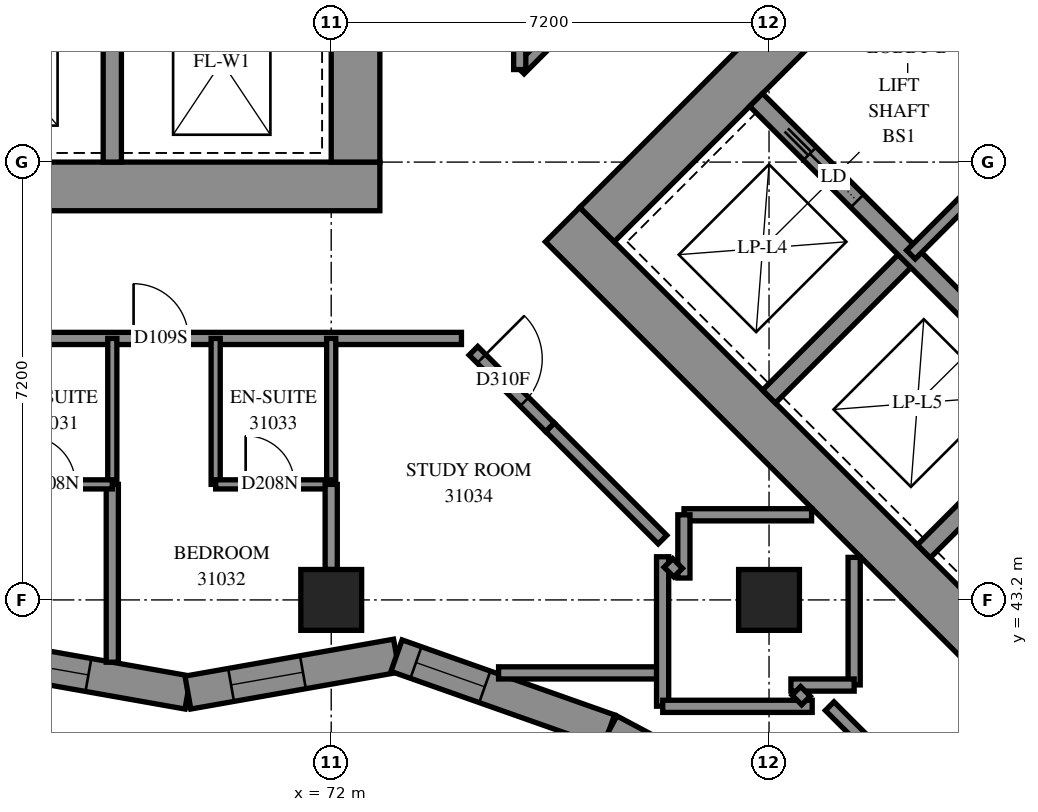
"""IFC4 building model, lengths in metres.
Left out: names, types, materials, properties, quantities, classifications, styles, units other than length and angle.
Written with IfcOpenShell. Run it as: python <this file> out.ifc"""

import sys

from ifc_helpers import new_model, si_unit, direction, frame, frame_2d, origin, origin_2d, place, context, subcontext, project, spatial, polyline, rectangle, outline, extrude, element, fill, save


model = new_model("IFC4")
c1 = context("Model", 3, precision=1e-05, world=origin(), true_north=direction((0.0, 1.0)))
c2 = subcontext(c1, "Body", "Model", "MODEL_VIEW")
j1 = project(units=[si_unit("LENGTHUNIT", "METRE"), si_unit("PLANEANGLEUNIT", "RADIAN")], contexts=[c1])
p1 = place(None, origin())
s1 = spatial("IfcSite", under=j1, at=p1, CompositionType="ELEMENT")
p2 = place(p1, origin())
s2 = spatial("IfcBuilding", under=s1, at=p2, CompositionType="ELEMENT")
p3 = place(p2, frame((0.0, 0.0, 115.2)))
s3 = spatial("IfcBuildingStorey", under=s2, at=p3, CompositionType="ELEMENT", Elevation=115.2)
for number, where, z_axis, x_axis in (
    (1, (72.0, 43.2, 0.0), (0.0, 0.0, 1.0), (1.0, 0.0, 0.0)),
    (2, (79.2, 43.2, 0.0), (0.0, 0.0, 1.0), (1.0, 0.0, 0.0)),
):
    element("IfcColumn", number, at=place(p3, frame(where, z_axis=z_axis, x_axis=x_axis)), inside=s3, PredefinedType="COLUMN", context=c2, shape_type="SweptSolid", body=[
        extrude(rectangle(XDim=1.0, YDim=1.0, at=origin_2d()), origin(), (0.0, 0.0, 1.0), 3.1),
    ])
p4 = place(p3, frame((56.8, 50.0, -0.3), z_axis=(0.0, 0.0, 1.0), x_axis=(1.0, 0.0, 0.0)))
e3 = element("IfcWall", 3, at=p4, inside=s3, PredefinedType="SHEAR", context=c2, shape_type="SweptSolid", body=[
    extrude(rectangle(XDim=16.0, YDim=0.8, at=frame_2d((8.0, 0.0))), origin(), (0.0, 0.0, 1.0), 2.7),
])
p5 = place(p3, frame((72.4, 50.4, -0.3), z_axis=(0.0, 0.0, 1.0), x_axis=(0.0, 1.0, 0.0)))
e4 = element("IfcWall", 4, at=p5, inside=s3, PredefinedType="SHEAR", context=c2, shape_type="SweptSolid", body=[
    extrude(rectangle(XDim=14.4, YDim=0.8, at=frame_2d((7.2, 0.0))), origin(), (0.0, 0.0, 1.0), 2.7),
])
p6 = place(p5, frame((4.55, 0.0, 0.3)))
e5 = element("IfcOpeningElement", 5, at=p6, cuts=e4, PredefinedType="OPENING", context=c2, shape_type="SweptSolid", body=[
    extrude(rectangle(XDim=1.1, YDim=2.1, at=frame_2d((0.55, 1.05))), frame((0.0, 0.41, 0.0), z_axis=(0.0, -1.0, 0.0), x_axis=(1.0, 0.0, 0.0)), (0.0, 0.0, 1.0), 0.82),
])
p7 = place(p5, frame((11.35, 0.0, 0.3)))
e6 = element("IfcOpeningElement", 6, at=p7, cuts=e4, PredefinedType="OPENING", context=c2, shape_type="SweptSolid", body=[
    extrude(rectangle(XDim=1.1, YDim=2.1, at=frame_2d((0.55, 1.05))), frame((0.0, 0.41, 0.0), z_axis=(0.0, -1.0, 0.0), x_axis=(1.0, 0.0, 0.0)), (0.0, 0.0, 1.0), 0.82),
])
p8 = place(p3, frame((68.4, 50.4, 0.0), z_axis=(0.0, 0.0, 1.0), x_axis=(0.0, 1.0, 0.0)))
e7 = element("IfcWall", 7, at=p8, inside=s3, PredefinedType="SOLIDWALL", context=c2, shape_type="SweptSolid", body=[
    extrude(rectangle(XDim=3.3, YDim=0.3, at=frame_2d((1.65, 0.0))), origin(), (0.0, 0.0, 1.0), 3.1),
])
p9 = place(p3, frame((75.806, 49.373, -0.3), z_axis=(0.0, 0.0, 1.0), x_axis=(0.7071067812, -0.7071067812, 0.0)))
e8 = element("IfcWall", 8, at=p9, inside=s3, PredefinedType="SHEAR", context=c2, shape_type="SweptSolid", body=[
    extrude(rectangle(XDim=16.0, YDim=0.8, at=frame_2d((8.0, 0.0))), origin(), (0.0, 0.0, 1.0), 2.7),
])
p10 = place(p3, frame((76.372, 49.373, -0.3), z_axis=(0.0, 0.0, 1.0), x_axis=(0.7071067812, 0.7071067812, 0.0)))
e9 = element("IfcWall", 9, at=p10, inside=s3, PredefinedType="SHEAR", context=c2, shape_type="SweptSolid", body=[
    extrude(rectangle(XDim=14.4, YDim=0.8, at=frame_2d((7.2, 0.0))), origin(), (0.0, 0.0, 1.0), 2.7),
])
p11 = place(p10, frame((4.55, 0.0, 0.3)))
e10 = element("IfcOpeningElement", 10, at=p11, cuts=e9, PredefinedType="OPENING", context=c2, shape_type="SweptSolid", body=[
    extrude(rectangle(XDim=1.1, YDim=2.1, at=frame_2d((0.55, 1.05))), frame((0.0, 0.41, 0.0), z_axis=(0.0, -1.0, 0.0), x_axis=(1.0, 0.0, 0.0)), (0.0, 0.0, 1.0), 0.82),
])
p12 = place(p10, frame((11.35, 0.0, 0.3)))
e11 = element("IfcOpeningElement", 11, at=p12, cuts=e9, PredefinedType="OPENING", context=c2, shape_type="SweptSolid", body=[
    extrude(rectangle(XDim=1.1, YDim=2.1, at=frame_2d((0.55, 1.05))), frame((0.0, 0.41, 0.0), z_axis=(0.0, -1.0, 0.0), x_axis=(1.0, 0.0, 0.0)), (0.0, 0.0, 1.0), 0.82),
])
p13 = place(p3, frame((79.2, 46.544, 0.0), z_axis=(0.0, 0.0, 1.0), x_axis=(0.7071219326, 0.7070916295, 0.0)))
e12 = element("IfcWall", 12, at=p13, inside=s3, PredefinedType="SOLIDWALL", context=c2, shape_type="SweptSolid", body=[
    extrude(rectangle(XDim=3.3, YDim=0.3, at=frame_2d((1.65, 0.0))), origin(), (0.0, 0.0, 1.0), 3.1),
])
p14 = place(p3, frame((81.746, 43.999, 0.0), z_axis=(0.0, 0.0, 1.0), x_axis=(0.7071067812, 0.7071067812, 0.0)))
e13 = element("IfcWall", 13, at=p14, inside=s3, PredefinedType="SOLIDWALL", context=c2, shape_type="SweptSolid", body=[
    extrude(rectangle(XDim=3.3, YDim=0.3, at=frame_2d((1.65, 0.0))), origin(), (0.0, 0.0, 1.0), 3.1),
])
p15 = place(p3, frame((78.988, 51.423, 0.0), z_axis=(0.0, 0.0, 1.0), x_axis=(0.7071067812, -0.7071067812, 0.0)))
e14 = element("IfcWall", 14, at=p15, inside=s3, PredefinedType="SOLIDWALL", context=c2, shape_type="SweptSolid", body=[
    extrude(rectangle(XDim=14.4, YDim=0.3, at=frame_2d((7.2, 0.0))), origin(), (0.0, 0.0, 1.0), 3.1),
])
p16 = place(p15, frame((1.25, 0.0, 0.0)))
e15 = element("IfcOpeningElement", 15, at=p16, cuts=e14, PredefinedType="OPENING", context=c2, shape_type="SweptSolid", body=[
    extrude(rectangle(XDim=1.1, YDim=2.1, at=frame_2d((0.55, 1.05))), frame((0.0, 0.16, 0.0), z_axis=(0.0, -1.0, 0.0), x_axis=(1.0, 0.0, 0.0)), (0.0, 0.0, 1.0), 0.32),
])
p17 = place(p15, frame((4.85, 0.0, 0.0)))
e16 = element("IfcOpeningElement", 16, at=p17, cuts=e14, PredefinedType="OPENING", context=c2, shape_type="SweptSolid", body=[
    extrude(rectangle(XDim=1.1, YDim=2.1, at=frame_2d((0.55, 1.05))), frame((0.0, 0.16, 0.0), z_axis=(0.0, -1.0, 0.0), x_axis=(1.0, 0.0, 0.0)), (0.0, 0.0, 1.0), 0.32),
])
p18 = place(p15, frame((8.45, 0.0, 0.0)))
e17 = element("IfcOpeningElement", 17, at=p18, cuts=e14, PredefinedType="OPENING", context=c2, shape_type="SweptSolid", body=[
    extrude(rectangle(XDim=1.1, YDim=2.1, at=frame_2d((0.55, 1.05))), frame((0.0, 0.16, 0.0), z_axis=(0.0, -1.0, 0.0), x_axis=(1.0, 0.0, 0.0)), (0.0, 0.0, 1.0), 0.32),
])
p19 = place(p15, frame((12.05, 0.0, 0.0)))
e18 = element("IfcOpeningElement", 18, at=p19, cuts=e14, PredefinedType="OPENING", context=c2, shape_type="SweptSolid", body=[
    extrude(rectangle(XDim=1.1, YDim=2.1, at=frame_2d((0.55, 1.05))), frame((0.0, 0.16, 0.0), z_axis=(0.0, -1.0, 0.0), x_axis=(1.0, 0.0, 0.0)), (0.0, 0.0, 1.0), 0.32),
])
p20 = place(p3, frame((81.534, 53.969, 0.0), z_axis=(0.0, 0.0, 1.0), x_axis=(0.707103309, -0.7071102534, 0.0)))
e19 = element("IfcWall", 19, at=p20, inside=s3, PredefinedType="SOLIDWALL", context=c2, shape_type="SweptSolid", body=[
    extrude(rectangle(XDim=14.4, YDim=0.3, at=frame_2d((7.2, 0.0))), origin(), (0.0, 0.0, 1.0), 3.1),
])
p21 = place(p20, frame((12.05, 0.0, 0.0)))
e20 = element("IfcOpeningElement", 20, at=p21, cuts=e19, PredefinedType="OPENING", context=c2, shape_type="SweptSolid", body=[
    extrude(rectangle(XDim=1.1, YDim=2.1, at=frame_2d((0.55, 1.05))), frame((0.0, 0.16, 0.0), z_axis=(0.0, -1.0, 0.0), x_axis=(1.0, 0.0, 0.0)), (0.0, 0.0, 1.0), 0.32),
])
p22 = place(p3, frame((66.236, 42.279, 0.0), z_axis=(0.0, 0.0, 1.0), x_axis=(0.9846979018, -0.1742700266, 0.0)))
e21 = element("IfcWall", 21, at=p22, inside=s3, PredefinedType="SOLIDWALL", context=c2, shape_type="SweptSolid", body=[
    extrude(outline(polyline([(0.049, -0.275), (3.509, -0.275), (3.412, 0.275), (-0.049, 0.275), (0.049, -0.275)])), origin(), (0.0, 0.0, 1.0), 3.1),
])
p23 = place(p22, frame((0.599, 0.0, 0.5)))
e22 = element("IfcOpeningElement", 22, at=p23, cuts=e21, PredefinedType="OPENING", context=c2, shape_type="SweptSolid", body=[
    extrude(rectangle(XDim=1.2, YDim=2.45, at=frame_2d((0.6, 1.225))), frame((0.0, 0.285, 0.0), z_axis=(0.0, -1.0, 0.0), x_axis=(1.0, 0.0, 0.0)), (0.0, 0.0, 1.0), 0.57),
])
p24 = place(p3, frame((69.643, 41.676, 0.0), z_axis=(0.0, 0.0, 1.0), x_axis=(0.9846990638, 0.1742634606, 0.0)))
e23 = element("IfcWall", 23, at=p24, inside=s3, PredefinedType="SOLIDWALL", context=c2, shape_type="SweptSolid", body=[
    extrude(outline(polyline([(-0.049, -0.275), (3.412, -0.275), (3.556, 0.275), (0.049, 0.275), (-0.049, -0.275)])), origin(), (0.0, 0.0, 1.0), 3.1),
])
p25 = place(p24, frame((0.721, 0.0, 0.5)))
e24 = element("IfcOpeningElement", 24, at=p25, cuts=e23, PredefinedType="OPENING", context=c2, shape_type="SweptSolid", body=[
    extrude(rectangle(XDim=1.2, YDim=2.45, at=frame_2d((0.6, 1.225))), frame((0.0, 0.285, 0.0), z_axis=(0.0, -1.0, 0.0), x_axis=(1.0, 0.0, 0.0)), (0.0, 0.0, 1.0), 0.57),
])
p26 = place(p3, frame((73.074, 42.283, 0.0), z_axis=(0.0, 0.0, 1.0), x_axis=(0.9429529685, -0.3329259665, 0.0)))
e25 = element("IfcWall", 25, at=p26, inside=s3, PredefinedType="SOLIDWALL", context=c2, shape_type="SweptSolid", body=[
    extrude(outline(polyline([(0.072, -0.275), (3.686, -0.275), (3.727, 0.275), (-0.072, 0.275), (0.072, -0.275)])), origin(), (0.0, 0.0, 1.0), 3.1),
])
p27 = place(p26, frame((0.34, 0.0, 0.5)))
e26 = element("IfcOpeningElement", 26, at=p27, cuts=e25, PredefinedType="OPENING", context=c2, shape_type="SweptSolid", body=[
    extrude(rectangle(XDim=1.2, YDim=2.45, at=frame_2d((0.6, 1.225))), frame((0.0, 0.285, 0.0), z_axis=(0.0, -1.0, 0.0), x_axis=(1.0, 0.0, 0.0)), (0.0, 0.0, 1.0), 0.57),
])
p28 = place(p3, frame((76.569, 41.05, 0.0), z_axis=(0.0, 0.0, 1.0), x_axis=(0.882964841, -0.4694391223, 0.0)))
e27 = element("IfcWall", 27, at=p28, inside=s3, PredefinedType="SOLIDWALL", context=c2, shape_type="SweptSolid", body=[
    extrude(outline(polyline([(0.021, -0.275), (4.135, -0.275), (4.26, 0.275), (-0.021, 0.275), (0.021, -0.275)])), origin(), (0.0, 0.0, 1.0), 3.1),
])
p29 = place(p28, frame((0.724, 0.0, 0.5)))
e28 = element("IfcOpeningElement", 28, at=p29, cuts=e27, PredefinedType="OPENING", context=c2, shape_type="SweptSolid", body=[
    extrude(rectangle(XDim=1.2, YDim=2.45, at=frame_2d((0.6, 1.225))), frame((0.0, 0.285, 0.0), z_axis=(0.0, -1.0, 0.0), x_axis=(1.0, 0.0, 0.0)), (0.0, 0.0, 1.0), 0.57),
])
p30 = place(p28, frame((2.223, 0.0, 0.5)))
e29 = element("IfcOpeningElement", 29, at=p30, cuts=e27, PredefinedType="OPENING", context=c2, shape_type="SweptSolid", body=[
    extrude(rectangle(XDim=1.2, YDim=2.45, at=frame_2d((0.6, 1.225))), frame((0.0, 0.285, 0.0), z_axis=(0.0, -1.0, 0.0), x_axis=(1.0, 0.0, 0.0)), (0.0, 0.0, 1.0), 0.57),
])
p31 = place(p3, frame((81.534, 48.878, 0.0), z_axis=(0.0, 0.0, 1.0), x_axis=(0.707092892, 0.7071206701, 0.0)))
e30 = element("IfcWall", 30, at=p31, inside=s3, PredefinedType="PARTITIONING", context=c2, shape_type="SweptSolid", body=[
    extrude(rectangle(XDim=3.6, YDim=0.2, at=frame_2d((1.8, 0.0))), origin(), (0.0, 0.0, 1.0), 3.1),
])
p32 = place(p3, frame((54.7, 47.5, 0.0), z_axis=(0.0, 0.0, 1.0), x_axis=(1.0, 0.0, 0.0)))
e31 = element("IfcWall", 31, at=p32, inside=s3, PredefinedType="PARTITIONING", context=c2, shape_type="SweptSolid", body=[
    extrude(rectangle(XDim=19.442, YDim=0.2, at=frame_2d((9.721, 0.0))), origin(), (0.0, 0.0, 1.0), 3.1),
])
p33 = place(p32, frame((5.2, 0.0, 0.0)))
e32 = element("IfcOpeningElement", 32, at=p33, cuts=e31, PredefinedType="OPENING", context=c2, shape_type="SweptSolid", body=[
    extrude(rectangle(XDim=0.9, YDim=2.1, at=frame_2d((0.45, 1.05))), frame((0.0, 0.11, 0.0), z_axis=(0.0, -1.0, 0.0), x_axis=(1.0, 0.0, 0.0)), (0.0, 0.0, 1.0), 0.22),
])
p34 = place(p32, frame((8.757, 0.0, 0.0)))
e33 = element("IfcOpeningElement", 33, at=p34, cuts=e31, PredefinedType="OPENING", context=c2, shape_type="SweptSolid", body=[
    extrude(rectangle(XDim=0.9, YDim=2.1, at=frame_2d((0.45, 1.05))), frame((0.0, 0.11, 0.0), z_axis=(0.0, -1.0, 0.0), x_axis=(1.0, 0.0, 0.0)), (0.0, 0.0, 1.0), 0.22),
])
p35 = place(p32, frame((14.05, 0.0, 0.0)))
e34 = element("IfcOpeningElement", 34, at=p35, cuts=e31, PredefinedType="OPENING", context=c2, shape_type="SweptSolid", body=[
    extrude(rectangle(XDim=0.9, YDim=2.1, at=frame_2d((0.45, 1.05))), frame((0.0, 0.11, 0.0), z_axis=(0.0, -1.0, 0.0), x_axis=(1.0, 0.0, 0.0)), (0.0, 0.0, 1.0), 0.22),
])
p36 = place(p3, frame((80.197, 41.453, 0.0), z_axis=(0.0, 0.0, 1.0), x_axis=(0.7071067812, -0.7071067812, 0.0)))
e35 = element("IfcWall", 35, at=p36, inside=s3, PredefinedType="PARTITIONING", context=c2, shape_type="SweptSolid", body=[
    extrude(rectangle(XDim=6.488, YDim=0.2, at=frame_2d((3.244, 0.0))), origin(), (0.0, 0.0, 1.0), 3.1),
])
p37 = place(p3, frame((68.4, 42.176, 0.0), z_axis=(0.0, 0.0, 1.0), x_axis=(0.0, 1.0, 0.0)))
e36 = element("IfcWall", 36, at=p37, inside=s3, PredefinedType="PARTITIONING", context=c2, shape_type="SweptSolid", body=[
    extrude(rectangle(XDim=2.924, YDim=0.2, at=frame_2d((1.462, 0.0))), origin(), (0.0, 0.0, 1.0), 3.1),
])
p38 = place(p3, frame((75.102, 51.922, 0.0), z_axis=(0.0, 0.0, 1.0), x_axis=(0.7071067812, 0.7071067812, 0.0)))
e37 = element("IfcWall", 37, at=p38, inside=s3, PredefinedType="PARTITIONING", context=c2, shape_type="SweptSolid", body=[
    extrude(rectangle(XDim=2.797, YDim=0.2, at=frame_2d((1.399, 0.0))), origin(), (0.0, 0.0, 1.0), 3.1),
])
p39 = place(p3, frame((74.752, 42.0, 0.0), z_axis=(0.0, 0.0, 1.0), x_axis=(1.0, 0.0, 0.0)))
e38 = element("IfcWall", 38, at=p39, inside=s3, PredefinedType="PARTITIONING", context=c2, shape_type="SweptSolid", body=[
    extrude(rectangle(XDim=2.698, YDim=0.2, at=frame_2d((1.349, 0.0))), origin(), (0.0, 0.0, 1.0), 3.1),
])
p40 = place(p3, frame((75.598, 46.04, 0.0), z_axis=(0.0, 0.0, 1.0), x_axis=(0.7074891043, -0.7067242512, 0.0)))
e39 = element("IfcWall", 39, at=p40, inside=s3, PredefinedType="PARTITIONING", context=c2, shape_type="SweptSolid", body=[
    extrude(rectangle(XDim=2.615, YDim=0.2, at=frame_2d((1.308, 0.0))), origin(), (0.0, 0.0, 1.0), 3.1),
])
for number, where, z_axis, x_axis in (
    (40, (77.45, 41.452, 0.0), (0.0, 0.0, 1.0), (0.0, 1.0, 0.0)),
    (41, (77.452, 41.45, 0.0), (0.0, 0.0, 1.0), (1.0, 0.0, 0.0)),
):
    element("IfcWall", number, at=place(p3, frame(where, z_axis=z_axis, x_axis=x_axis)), inside=s3, PredefinedType="PARTITIONING", context=c2, shape_type="SweptSolid", body=[
        extrude(rectangle(XDim=2.458, YDim=0.2, at=frame_2d((1.229, 0.0))), origin(), (0.0, 0.0, 1.0), 3.1),
    ])
for number, where, z_axis, x_axis in (
    (42, (68.4, 45.1, 0.0), (0.0, 0.0, 1.0), (0.0, 1.0, 0.0)),
    (43, (70.1, 45.1, 0.0), (0.0, 0.0, 1.0), (0.0, 1.0, 0.0)),
    (44, (72.0, 45.1, 0.0), (0.0, 0.0, 1.0), (0.0, 1.0, 0.0)),
):
    element("IfcWall", number, at=place(p3, frame(where, z_axis=z_axis, x_axis=x_axis)), inside=s3, PredefinedType="PARTITIONING", context=c2, shape_type="SweptSolid", body=[
        extrude(rectangle(XDim=2.4, YDim=0.15, at=frame_2d((1.2, 0.0))), origin(), (0.0, 0.0, 1.0), 3.1),
    ])
for number, where, z_axis, x_axis in (
    (45, (77.802, 44.6, 0.0), (0.0, 0.0, 1.0), (1.0, 0.0, 0.0)),
    (46, (80.6, 41.802, 0.0), (0.0, 0.0, 1.0), (0.0, 1.0, 0.0)),
):
    element("IfcWall", number, at=place(p3, frame(where, z_axis=z_axis, x_axis=x_axis)), inside=s3, PredefinedType="PARTITIONING", context=c2, shape_type="SweptSolid", body=[
        extrude(rectangle(XDim=2.098, YDim=0.2, at=frame_2d((1.049, 0.0))), origin(), (0.0, 0.0, 1.0), 3.1),
    ])
p41 = place(p3, frame((75.1, 51.922, 0.0), z_axis=(0.0, 0.0, 1.0), x_axis=(0.0, 1.0, 0.0)))
e47 = element("IfcWall", 47, at=p41, inside=s3, PredefinedType="PARTITIONING", context=c2, shape_type="SweptSolid", body=[
    extrude(rectangle(XDim=1.978, YDim=0.2, at=frame_2d((0.989, 0.0))), origin(), (0.0, 0.0, 1.0), 3.1),
])
p42 = place(p3, frame((66.5, 45.1, 0.0), z_axis=(0.0, 0.0, 1.0), x_axis=(1.0, 0.0, 0.0)))
e48 = element("IfcWall", 48, at=p42, inside=s3, PredefinedType="PARTITIONING", context=c2, shape_type="SweptSolid", body=[
    extrude(rectangle(XDim=1.9, YDim=0.15, at=frame_2d((0.95, 0.0))), origin(), (0.0, 0.0, 1.0), 3.1),
])
p43 = place(p42, frame((0.493, 0.0, 0.0)))
e49 = element("IfcOpeningElement", 49, at=p43, cuts=e48, PredefinedType="OPENING", context=c2, shape_type="SweptSolid", body=[
    extrude(rectangle(XDim=0.8, YDim=2.1, at=frame_2d((0.4, 1.05))), frame((0.0, 0.085, 0.0), z_axis=(0.0, -1.0, 0.0), x_axis=(1.0, 0.0, 0.0)), (0.0, 0.0, 1.0), 0.17),
])
p44 = place(p3, frame((70.1, 45.1, 0.0), z_axis=(0.0, 0.0, 1.0), x_axis=(1.0, 0.0, 0.0)))
e50 = element("IfcWall", 50, at=p44, inside=s3, PredefinedType="PARTITIONING", context=c2, shape_type="SweptSolid", body=[
    extrude(rectangle(XDim=1.9, YDim=0.15, at=frame_2d((0.95, 0.0))), origin(), (0.0, 0.0, 1.0), 3.1),
])
p45 = place(p44, frame((0.493, 0.0, 0.0)))
e51 = element("IfcOpeningElement", 51, at=p45, cuts=e50, PredefinedType="OPENING", context=c2, shape_type="SweptSolid", body=[
    extrude(rectangle(XDim=0.8, YDim=2.1, at=frame_2d((0.4, 1.05))), frame((0.0, 0.085, 0.0), z_axis=(0.0, -1.0, 0.0), x_axis=(1.0, 0.0, 0.0)), (0.0, 0.0, 1.0), 0.17),
])
p46 = place(p3, frame((74.339, 47.297, 0.0), z_axis=(0.0, 0.0, 1.0), x_axis=(0.7071067812, -0.7071067812, 0.0)))
e52 = element("IfcWall", 52, at=p46, inside=s3, PredefinedType="PARTITIONING", context=c2, shape_type="SweptSolid", body=[
    extrude(rectangle(XDim=1.779, YDim=0.2, at=frame_2d((0.889, 0.0))), origin(), (0.0, 0.0, 1.0), 3.1),
])
p47 = place(p46, frame((0.186, 0.0, 0.0)))
e53 = element("IfcOpeningElement", 53, at=p47, cuts=e52, PredefinedType="OPENING", context=c2, shape_type="SweptSolid", body=[
    extrude(rectangle(XDim=1.0, YDim=2.1, at=frame_2d((0.5, 1.05))), frame((0.0, 0.11, 0.0), z_axis=(0.0, -1.0, 0.0), x_axis=(1.0, 0.0, 0.0)), (0.0, 0.0, 1.0), 0.22),
])
p48 = place(p3, frame((72.0, 43.7, 0.0), z_axis=(0.0, 0.0, 1.0), x_axis=(0.0, 1.0, 0.0)))
e54 = element("IfcWall", 54, at=p48, inside=s3, PredefinedType="PARTITIONING", context=c2, shape_type="SweptSolid", body=[
    extrude(rectangle(XDim=1.4, YDim=0.2, at=frame_2d((0.7, 0.0))), origin(), (0.0, 0.0, 1.0), 3.1),
])
for number, where, z_axis, x_axis in (
    (55, (77.8, 43.56, 0.0), (0.0, 0.0, 1.0), (0.0, 1.0, 0.0)),
    (56, (79.56, 41.8, 0.0), (0.0, 0.0, 1.0), (1.0, 0.0, 0.0)),
):
    element("IfcWall", number, at=place(p3, frame(where, z_axis=z_axis, x_axis=x_axis)), inside=s3, PredefinedType="PARTITIONING", context=c2, shape_type="SweptSolid", body=[
        extrude(rectangle(XDim=1.04, YDim=0.2, at=frame_2d((0.52, 0.0))), origin(), (0.0, 0.0, 1.0), 3.1),
    ])
for number, where, z_axis, x_axis in (
    (57, (79.649, 41.705, 0.0), (0.0, 0.0, 1.0), (0.707, -0.707, 0.0)),
    (58, (77.546, 43.808, 0.0), (0.0, 0.0, 1.0), (0.707, -0.707, 0.0)),
):
    element("IfcWall", number, at=place(p3, frame(where, z_axis=z_axis, x_axis=x_axis)), inside=s3, PredefinedType="PARTITIONING", context=c2, shape_type="SweptSolid", body=[
        extrude(rectangle(XDim=0.225, YDim=0.2, at=frame_2d((0.112, 0.0))), origin(), (0.0, 0.0, 1.0), 3.1),
    ])
p49 = place(p23, origin())
e59 = element("IfcWindow", 59, at=p49, inside=s3, PartitioningType="SINGLE_PANEL", PredefinedType="WINDOW", context=c2, shape_type="SweptSolid", body=[
    extrude(rectangle(XDim=1.2, YDim=2.45, at=frame_2d((0.6, 1.225))), frame((0.0, 0.155, 0.0), z_axis=(0.0, -1.0, 0.0), x_axis=(1.0, 0.0, 0.0)), (0.0, 0.0, 1.0), 0.06),
])
fill(e22, e59)
p50 = place(p25, origin())
e60 = element("IfcWindow", 60, at=p50, inside=s3, PartitioningType="SINGLE_PANEL", PredefinedType="WINDOW", context=c2, shape_type="SweptSolid", body=[
    extrude(rectangle(XDim=1.2, YDim=2.45, at=frame_2d((0.6, 1.225))), frame((0.0, 0.155, 0.0), z_axis=(0.0, -1.0, 0.0), x_axis=(1.0, 0.0, 0.0)), (0.0, 0.0, 1.0), 0.06),
])
fill(e24, e60)
p51 = place(p27, origin())
e61 = element("IfcWindow", 61, at=p51, inside=s3, PartitioningType="SINGLE_PANEL", PredefinedType="WINDOW", context=c2, shape_type="SweptSolid", body=[
    extrude(rectangle(XDim=1.2, YDim=2.45, at=frame_2d((0.6, 1.225))), frame((0.0, 0.155, 0.0), z_axis=(0.0, -1.0, 0.0), x_axis=(1.0, 0.0, 0.0)), (0.0, 0.0, 1.0), 0.06),
])
fill(e26, e61)
p52 = place(p16, origin())
e62 = element("IfcDoor", 62, at=p52, inside=s3, OperationType="SLIDING_TO_LEFT", PredefinedType="DOOR", context=c2, shape_type="SweptSolid", body=[
    extrude(rectangle(XDim=1.1, YDim=2.1, at=frame_2d((0.55, 1.05))), frame((0.0, 0.025, 0.0), z_axis=(0.0, -1.0, 0.0), x_axis=(1.0, 0.0, 0.0)), (0.0, 0.0, 1.0), 0.05),
])
fill(e15, e62)
p53 = place(p43, origin())
e63 = element("IfcDoor", 63, at=p53, inside=s3, OperationType="SINGLE_SWING_RIGHT", PredefinedType="DOOR", context=c2, shape_type="SweptSolid", body=[
    extrude(rectangle(XDim=0.8, YDim=2.1, at=frame_2d((0.4, 1.05))), frame((0.0, 0.025, 0.0), z_axis=(0.0, -1.0, 0.0), x_axis=(1.0, 0.0, 0.0)), (0.0, 0.0, 1.0), 0.05),
])
fill(e49, e63)
p54 = place(p35, origin())
e64 = element("IfcDoor", 64, at=p54, inside=s3, OperationType="SINGLE_SWING_RIGHT", PredefinedType="DOOR", context=c2, shape_type="SweptSolid", body=[
    extrude(rectangle(XDim=0.9, YDim=2.1, at=frame_2d((0.45, 1.05))), frame((0.0, 0.025, 0.0), z_axis=(0.0, -1.0, 0.0), x_axis=(1.0, 0.0, 0.0)), (0.0, 0.0, 1.0), 0.05),
])
fill(e34, e64)
p55 = place(p45, origin())
e65 = element("IfcDoor", 65, at=p55, inside=s3, OperationType="SINGLE_SWING_RIGHT", PredefinedType="DOOR", context=c2, shape_type="SweptSolid", body=[
    extrude(rectangle(XDim=0.8, YDim=2.1, at=frame_2d((0.4, 1.05))), frame((0.0, 0.025, 0.0), z_axis=(0.0, -1.0, 0.0), x_axis=(1.0, 0.0, 0.0)), (0.0, 0.0, 1.0), 0.05),
])
fill(e51, e65)
p56 = place(p47, origin())
e66 = element("IfcDoor", 66, at=p56, inside=s3, OperationType="SINGLE_SWING_LEFT", PredefinedType="DOOR", context=c2, shape_type="SweptSolid", body=[
    extrude(rectangle(XDim=1.0, YDim=2.1, at=frame_2d((0.5, 1.05))), frame((0.0, 0.025, 0.0), z_axis=(0.0, -1.0, 0.0), x_axis=(1.0, 0.0, 0.0)), (0.0, 0.0, 1.0), 0.05),
])
fill(e53, e66)
save(model, sys.argv[1])
